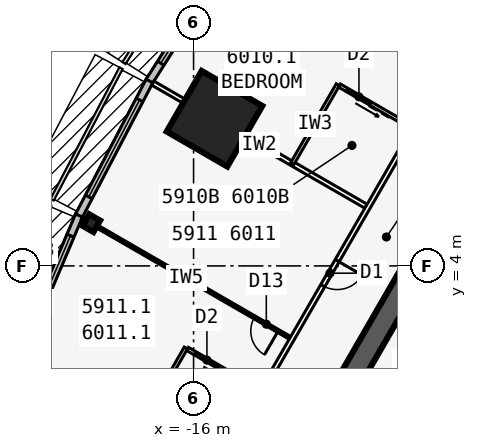
"""IFC4 building model, lengths in metres.
Left out: names, types, materials, properties, quantities, classifications, styles, units other than length and angle.
Written with IfcOpenShell. Run it as: python <this file> out.ifc"""

import sys

from ifc_helpers import new_model, si_unit, direction, frame, frame_2d, origin, origin_2d, place, context, subcontext, project, spatial, rectangle, i_section, extrude, element, fill, save


model = new_model("IFC4")
c1 = context("Model", 3, precision=1e-05, world=origin(), true_north=direction((0.0, 1.0)))
c2 = subcontext(c1, "Body", "Model", "MODEL_VIEW")
j1 = project(units=[si_unit("LENGTHUNIT", "METRE"), si_unit("PLANEANGLEUNIT", "RADIAN")], contexts=[c1])
p1 = place(None, origin())
s1 = spatial("IfcSite", under=j1, at=p1, CompositionType="ELEMENT")
p2 = place(p1, origin())
s2 = spatial("IfcBuilding", under=s1, at=p2, CompositionType="ELEMENT")
p3 = place(p2, frame((0.0, 0.0, 222.5)))
s3 = spatial("IfcBuildingStorey", under=s2, at=p3, CompositionType="ELEMENT", Elevation=222.5)
p4 = place(p3, frame((0.0, 19.052, 0.0), z_axis=(0.0, 0.0, 1.0), x_axis=(-0.499999749417, -0.866025548458, 0.0)))
e1 = element("IfcWall", 1, at=p4, inside=s3, PredefinedType="SHEAR", context=c2, shape_type="SweptSolid", body=[
    extrude(rectangle(XDim=33.0, YDim=0.75, at=frame_2d((16.5, 0.0))), origin(), (0.0, 0.0, 1.0), 3.6),
])
p5 = place(p4, frame((14.15, 0.0, 0.0)))
e2 = element("IfcOpeningElement", 2, at=p5, cuts=e1, PredefinedType="OPENING", context=c2, shape_type="SweptSolid", body=[
    extrude(rectangle(XDim=1.8, YDim=2.13, at=frame_2d((0.9, 1.065))), frame((0.0, 0.385, 0.0), z_axis=(0.0, -1.0, 0.0), x_axis=(1.0, 0.0, 0.0)), (0.0, 0.0, 1.0), 0.77),
])
p6 = place(p4, frame((12.6, 0.0, 0.0)))
e3 = element("IfcOpeningElement", 3, at=p6, cuts=e1, PredefinedType="OPENING", context=c2, shape_type="SweptSolid", body=[
    extrude(rectangle(XDim=1.0, YDim=2.13, at=frame_2d((0.5, 1.065))), frame((0.0, 0.385, 0.0), z_axis=(0.0, -1.0, 0.0), x_axis=(1.0, 0.0, 0.0)), (0.0, 0.0, 1.0), 0.77),
])
p7 = place(p3, frame((-4.929, 3.365, 0.0), z_axis=(0.0, 0.0, 1.0), x_axis=(-0.499991433582, -0.866030349552, 0.0)))
e4 = element("IfcWall", 4, at=p7, inside=s3, PredefinedType="SOLIDWALL", context=c2, shape_type="SweptSolid", body=[
    extrude(rectangle(XDim=10.633, YDim=0.25, at=frame_2d((5.316, 0.0))), origin(), (0.0, 0.0, 1.0), 3.435),
])
p8 = place(p7, frame((9.164, 0.0, 0.0)))
e5 = element("IfcOpeningElement", 5, at=p8, cuts=e4, PredefinedType="OPENING", context=c2, shape_type="SweptSolid", body=[
    extrude(rectangle(XDim=0.9, YDim=2.13, at=frame_2d((0.45, 1.065))), frame((0.0, 0.135, 0.0), z_axis=(0.0, -1.0, 0.0), x_axis=(1.0, 0.0, 0.0)), (0.0, 0.0, 1.0), 0.27),
])
p9 = place(p7, frame((1.1, 0.0, 0.0)))
e6 = element("IfcOpeningElement", 6, at=p9, cuts=e4, PredefinedType="OPENING", context=c2, shape_type="SweptSolid", body=[
    extrude(rectangle(XDim=0.9, YDim=2.13, at=frame_2d((0.45, 1.065))), frame((0.0, 0.135, 0.0), z_axis=(0.0, -1.0, 0.0), x_axis=(1.0, 0.0, 0.0)), (0.0, 0.0, 1.0), 0.27),
])
p10 = place(p7, frame((4.0, 0.0, 0.0)))
e7 = element("IfcOpeningElement", 7, at=p10, cuts=e4, PredefinedType="OPENING", context=c2, shape_type="SweptSolid", body=[
    extrude(rectangle(XDim=0.9, YDim=2.13, at=frame_2d((0.45, 1.065))), frame((0.0, 0.135, 0.0), z_axis=(0.0, -1.0, 0.0), x_axis=(1.0, 0.0, 0.0)), (0.0, 0.0, 1.0), 0.27),
])
p11 = place(p3, frame((-19.363, 5.406, 0.0), z_axis=(0.0, 0.0, 1.0), x_axis=(-0.866025403784, 0.5, 0.0)))
e8 = element("IfcColumn", 8, at=p11, inside=s3, PredefinedType="COLUMN", context=c2, shape_type="SweptSolid", body=[
    extrude(i_section(OverallWidth=0.411, OverallDepth=0.434, WebThickness=0.036, FlangeThickness=0.057, at=origin_2d()), origin(), (0.0, 0.0, 1.0), 3.6),
])
p12 = place(p3, frame((-15.312, 8.84, 0.0), z_axis=(0.0, 0.0, 1.0), x_axis=(-0.866025403784, 0.5, 0.0)))
e9 = element("IfcColumn", 9, at=p12, inside=s3, PredefinedType="COLUMN", context=c2, shape_type="SweptSolid", body=[
    extrude(rectangle(XDim=2.3, YDim=2.3, at=origin_2d()), origin(), (0.0, 0.0, 1.0), 3.6),
])
p13 = place(p3, frame((-14.777, 14.299, 0.0), z_axis=(0.0, 0.0, 1.0), x_axis=(-0.535220361449, -0.844712474568, 0.0)))
e10 = element("IfcWall", 10, at=p13, inside=s3, PredefinedType="STANDARD", context=c2, shape_type="SweptSolid", body=[
    extrude(rectangle(XDim=5.004, YDim=0.25, at=frame_2d((2.502, 0.0))), origin(), (0.0, 0.0, 1.0), 3.435),
])
p14 = place(p13, frame((0.702, 0.0, 0.45)))
e11 = element("IfcOpeningElement", 11, at=p14, cuts=e10, PredefinedType="OPENING", context=c2, shape_type="SweptSolid", body=[
    extrude(rectangle(XDim=3.6, YDim=2.6, at=frame_2d((1.8, 1.3))), frame((0.0, 0.135, 0.0), z_axis=(0.0, -1.0, 0.0), x_axis=(1.0, 0.0, 0.0)), (0.0, 0.0, 1.0), 0.27),
])
p15 = place(p3, frame((-17.45, 10.081, 0.0), z_axis=(0.0, 0.0, 1.0), x_axis=(-0.463976002579, -0.885847768542, 0.0)))
e12 = element("IfcWall", 12, at=p15, inside=s3, PredefinedType="STANDARD", context=c2, shape_type="SweptSolid", body=[
    extrude(rectangle(XDim=5.004, YDim=0.25, at=frame_2d((2.502, 0.0))), origin(), (0.0, 0.0, 1.0), 3.435),
])
p16 = place(p15, frame((0.702, 0.0, 0.45)))
e13 = element("IfcOpeningElement", 13, at=p16, cuts=e12, PredefinedType="OPENING", context=c2, shape_type="SweptSolid", body=[
    extrude(rectangle(XDim=3.6, YDim=2.6, at=frame_2d((1.8, 1.3))), frame((0.0, 0.135, 0.0), z_axis=(0.0, -1.0, 0.0), x_axis=(1.0, 0.0, 0.0)), (0.0, 0.0, 1.0), 0.27),
])
p17 = place(p3, frame((-19.768, 5.657, 0.0), z_axis=(0.0, 0.0, 1.0), x_axis=(-0.390096809471, -0.920773848044, 0.0)))
e14 = element("IfcWall", 14, at=p17, inside=s3, PredefinedType="STANDARD", context=c2, shape_type="SweptSolid", body=[
    extrude(rectangle(XDim=5.038, YDim=0.25, at=frame_2d((2.519, 0.0))), origin(), (0.0, 0.0, 1.0), 3.435),
])
p18 = place(p17, frame((0.719, 0.0, 0.45)))
e15 = element("IfcOpeningElement", 15, at=p18, cuts=e14, PredefinedType="OPENING", context=c2, shape_type="SweptSolid", body=[
    extrude(rectangle(XDim=3.6, YDim=2.6, at=frame_2d((1.8, 1.3))), frame((0.0, 0.135, 0.0), z_axis=(0.0, -1.0, 0.0), x_axis=(1.0, 0.0, 0.0)), (0.0, 0.0, 1.0), 0.27),
])
p19 = place(p3, frame((-0.425, 22.966, 0.0), z_axis=(0.0, 0.0, 1.0), x_axis=(-0.500000265775, -0.866025250339, 0.0)))
e16 = element("IfcWall", 16, at=p19, inside=s3, PredefinedType="PARTITIONING", context=c2, shape_type="SweptSolid", body=[
    extrude(rectangle(XDim=39.354, YDim=0.15, at=frame_2d((19.677, 0.0))), origin(), (0.0, 0.0, 1.0), 3.435),
])
p20 = place(p19, frame((1.665, 0.0, 0.0)))
e17 = element("IfcOpeningElement", 17, at=p20, cuts=e16, PredefinedType="OPENING", context=c2, shape_type="SweptSolid", body=[
    extrude(rectangle(XDim=0.95, YDim=2.13, at=frame_2d((0.475, 1.065))), frame((0.0, 0.085, 0.0), z_axis=(0.0, -1.0, 0.0), x_axis=(1.0, 0.0, 0.0)), (0.0, 0.0, 1.0), 0.17),
])
p21 = place(p19, frame((11.702, 0.0, 0.0)))
e18 = element("IfcOpeningElement", 18, at=p21, cuts=e16, PredefinedType="OPENING", context=c2, shape_type="SweptSolid", body=[
    extrude(rectangle(XDim=0.95, YDim=2.13, at=frame_2d((0.475, 1.065))), frame((0.0, 0.085, 0.0), z_axis=(0.0, -1.0, 0.0), x_axis=(1.0, 0.0, 0.0)), (0.0, 0.0, 1.0), 0.17),
])
p22 = place(p19, frame((21.702, 0.0, 0.0)))
e19 = element("IfcOpeningElement", 19, at=p22, cuts=e16, PredefinedType="OPENING", context=c2, shape_type="SweptSolid", body=[
    extrude(rectangle(XDim=0.95, YDim=2.13, at=frame_2d((0.475, 1.065))), frame((0.0, 0.085, 0.0), z_axis=(0.0, -1.0, 0.0), x_axis=(1.0, 0.0, 0.0)), (0.0, 0.0, 1.0), 0.17),
])
p23 = place(p19, frame((36.739, 0.0, 0.0)))
e20 = element("IfcOpeningElement", 20, at=p23, cuts=e16, PredefinedType="OPENING", context=c2, shape_type="SweptSolid", body=[
    extrude(rectangle(XDim=0.95, YDim=2.13, at=frame_2d((0.475, 1.065))), frame((0.0, 0.085, 0.0), z_axis=(0.0, -1.0, 0.0), x_axis=(1.0, 0.0, 0.0)), (0.0, 0.0, 1.0), 0.17),
])
p24 = place(p3, frame((-7.829, 10.293, 0.0), z_axis=(0.0, 0.0, 1.0), x_axis=(-0.866030558329, 0.49999107196, 0.0)))
e21 = element("IfcWall", 21, at=p24, inside=s3, PredefinedType="PARTITIONING", context=c2, shape_type="SweptSolid", body=[
    extrude(rectangle(XDim=7.894, YDim=0.1, at=frame_2d((3.947, 0.0))), origin(), (0.0, 0.0, 1.0), 2.589),
])
p25 = place(p24, frame((0.45, 0.0, 0.0)))
e22 = element("IfcOpeningElement", 22, at=p25, cuts=e21, PredefinedType="OPENING", context=c2, shape_type="SweptSolid", body=[
    extrude(rectangle(XDim=0.9, YDim=2.13, at=frame_2d((0.45, 1.065))), frame((0.0, 0.06, 0.0), z_axis=(0.0, -1.0, 0.0), x_axis=(1.0, 0.0, 0.0)), (0.0, 0.0, 1.0), 0.12),
])
p26 = place(p3, frame((-10.329, 5.963, 0.0), z_axis=(0.0, 0.0, 1.0), x_axis=(-0.866016460812, 0.500015489362, 0.0)))
e23 = element("IfcWall", 23, at=p26, inside=s3, PredefinedType="PARTITIONING", context=c2, shape_type="SweptSolid", body=[
    extrude(rectangle(XDim=8.101, YDim=0.15, at=frame_2d((4.051, 0.0))), origin(), (0.0, 0.0, 1.0), 2.589),
])
p27 = place(p3, frame((-12.829, 1.633, 0.0), z_axis=(0.0, 0.0, 1.0), x_axis=(-0.866030558329, 0.49999107196, 0.0)))
e24 = element("IfcWall", 24, at=p27, inside=s3, PredefinedType="PARTITIONING", context=c2, shape_type="SweptSolid", body=[
    extrude(rectangle(XDim=7.894, YDim=0.1, at=frame_2d((3.947, 0.0))), origin(), (0.0, 0.0, 1.0), 2.589),
])
p28 = place(p27, frame((0.45, 0.0, 0.0)))
e25 = element("IfcOpeningElement", 25, at=p28, cuts=e24, PredefinedType="OPENING", context=c2, shape_type="SweptSolid", body=[
    extrude(rectangle(XDim=0.9, YDim=2.13, at=frame_2d((0.45, 1.065))), frame((0.0, 0.06, 0.0), z_axis=(0.0, -1.0, 0.0), x_axis=(1.0, 0.0, 0.0)), (0.0, 0.0, 1.0), 0.12),
])
p29 = place(p3, frame((-15.329, -2.697, 0.0), z_axis=(0.0, 0.0, 1.0), x_axis=(-0.866032413668, 0.499987858329, 0.0)))
e26 = element("IfcWall", 26, at=p29, inside=s3, PredefinedType="PARTITIONING", context=c2, shape_type="SweptSolid", body=[
    extrude(rectangle(XDim=7.273, YDim=0.15, at=frame_2d((3.636, 0.0))), origin(), (0.0, 0.0, 1.0), 2.589),
])
p30 = place(p3, frame((-11.253, 9.961, 0.0), z_axis=(0.0, 0.0, 1.0), x_axis=(-0.499990139034, -0.866031096941, 0.0)))
e27 = element("IfcWall", 27, at=p30, inside=s3, PredefinedType="PLUMBINGWALL", context=c2, shape_type="SweptSolid", body=[
    extrude(rectangle(XDim=3.0, YDim=0.12, at=frame_2d((1.5, 0.0))), origin(), (0.0, 0.0, 1.0), 3.435),
])
p31 = place(p3, frame((-8.829, 8.561, 0.0), z_axis=(0.0, 0.0, 1.0), x_axis=(-0.866035715982, 0.499982138324, 0.0)))
e28 = element("IfcWall", 28, at=p31, inside=s3, PredefinedType="PLUMBINGWALL", context=c2, shape_type="SweptSolid", body=[
    extrude(rectangle(XDim=2.74, YDim=0.12, at=frame_2d((1.37, 0.0))), origin(), (0.0, 0.0, 1.0), 3.435),
])
p32 = place(p31, frame((1.55, 0.0, 0.0)))
e29 = element("IfcOpeningElement", 29, at=p32, cuts=e28, PredefinedType="OPENING", context=c2, shape_type="SweptSolid", body=[
    extrude(rectangle(XDim=0.9, YDim=2.13, at=frame_2d((0.45, 1.065))), frame((0.0, 0.07, 0.0), z_axis=(0.0, -1.0, 0.0), x_axis=(1.0, 0.0, 0.0)), (0.0, 0.0, 1.0), 0.14),
])
p33 = place(p3, frame((-16.253, 1.301, 0.0), z_axis=(0.0, 0.0, 1.0), x_axis=(-0.499990139034, -0.866031096941, 0.0)))
e30 = element("IfcWall", 30, at=p33, inside=s3, PredefinedType="PLUMBINGWALL", context=c2, shape_type="SweptSolid", body=[
    extrude(rectangle(XDim=3.0, YDim=0.12, at=frame_2d((1.5, 0.0))), origin(), (0.0, 0.0, 1.0), 3.435),
])
p34 = place(p3, frame((-13.829, -0.099, 0.0), z_axis=(0.0, 0.0, 1.0), x_axis=(-0.865997131366, 0.500048966069, 0.0)))
e31 = element("IfcWall", 31, at=p34, inside=s3, PredefinedType="PLUMBINGWALL", context=c2, shape_type="SweptSolid", body=[
    extrude(rectangle(XDim=2.74, YDim=0.12, at=frame_2d((1.37, 0.0))), origin(), (0.0, 0.0, 1.0), 3.435),
])
p35 = place(p34, frame((1.55, 0.0, 0.0)))
e32 = element("IfcOpeningElement", 32, at=p35, cuts=e31, PredefinedType="OPENING", context=c2, shape_type="SweptSolid", body=[
    extrude(rectangle(XDim=0.9, YDim=2.13, at=frame_2d((0.45, 1.065))), frame((0.0, 0.07, 0.0), z_axis=(0.0, -1.0, 0.0), x_axis=(1.0, 0.0, 0.0)), (0.0, 0.0, 1.0), 0.14),
])
p36 = place(p14, origin())
e33 = element("IfcWindow", 33, at=p36, inside=s3, PartitioningType="SINGLE_PANEL", PredefinedType="WINDOW", context=c2, shape_type="SweptSolid", body=[
    extrude(rectangle(XDim=3.6, YDim=2.6, at=frame_2d((1.8, 1.3))), frame((0.0, 0.03, 0.0), z_axis=(0.0, -1.0, 0.0), x_axis=(1.0, 0.0, 0.0)), (0.0, 0.0, 1.0), 0.06),
])
fill(e11, e33)
p37 = place(p16, origin())
e34 = element("IfcWindow", 34, at=p37, inside=s3, PartitioningType="SINGLE_PANEL", PredefinedType="WINDOW", context=c2, shape_type="SweptSolid", body=[
    extrude(rectangle(XDim=3.6, YDim=2.6, at=frame_2d((1.8, 1.3))), frame((0.0, 0.03, 0.0), z_axis=(0.0, -1.0, 0.0), x_axis=(1.0, 0.0, 0.0)), (0.0, 0.0, 1.0), 0.06),
])
fill(e13, e34)
p38 = place(p18, origin())
e35 = element("IfcWindow", 35, at=p38, inside=s3, PartitioningType="SINGLE_PANEL", PredefinedType="WINDOW", context=c2, shape_type="SweptSolid", body=[
    extrude(rectangle(XDim=3.6, YDim=2.6, at=frame_2d((1.8, 1.3))), frame((0.0, 0.03, 0.0), z_axis=(0.0, -1.0, 0.0), x_axis=(1.0, 0.0, 0.0)), (0.0, 0.0, 1.0), 0.06),
])
fill(e15, e35)
p39 = place(p28, origin())
e36 = element("IfcDoor", 36, at=p39, inside=s3, OperationType="SINGLE_SWING_LEFT", PredefinedType="DOOR", context=c2, shape_type="SweptSolid", body=[
    extrude(rectangle(XDim=0.9, YDim=2.13, at=frame_2d((0.45, 1.065))), frame((0.0, 0.025, 0.0), z_axis=(0.0, -1.0, 0.0), x_axis=(1.0, 0.0, 0.0)), (0.0, 0.0, 1.0), 0.05),
])
fill(e25, e36)
p40 = place(p32, origin())
e37 = element("IfcDoor", 37, at=p40, inside=s3, OperationType="SLIDING_TO_LEFT", PredefinedType="DOOR", context=c2, shape_type="SweptSolid", body=[
    extrude(rectangle(XDim=0.9, YDim=2.13, at=frame_2d((0.45, 1.065))), frame((0.0, 0.025, 0.0), z_axis=(0.0, -1.0, 0.0), x_axis=(1.0, 0.0, 0.0)), (0.0, 0.0, 1.0), 0.05),
])
fill(e29, e37)
p41 = place(p22, origin())
e38 = element("IfcDoor", 38, at=p41, inside=s3, OperationType="SINGLE_SWING_LEFT", PredefinedType="DOOR", context=c2, shape_type="SweptSolid", body=[
    extrude(rectangle(XDim=0.95, YDim=2.13, at=frame_2d((0.475, 1.065))), frame((0.0, 0.025, 0.0), z_axis=(0.0, -1.0, 0.0), x_axis=(1.0, 0.0, 0.0)), (0.0, 0.0, 1.0), 0.05),
])
fill(e19, e38)
p42 = place(p35, origin())
e39 = element("IfcDoor", 39, at=p42, inside=s3, OperationType="SLIDING_TO_LEFT", PredefinedType="DOOR", context=c2, shape_type="SweptSolid", body=[
    extrude(rectangle(XDim=0.9, YDim=2.13, at=frame_2d((0.45, 1.065))), frame((0.0, 0.025, 0.0), z_axis=(0.0, -1.0, 0.0), x_axis=(1.0, 0.0, 0.0)), (0.0, 0.0, 1.0), 0.05),
])
fill(e32, e39)
save(model, sys.argv[1])
